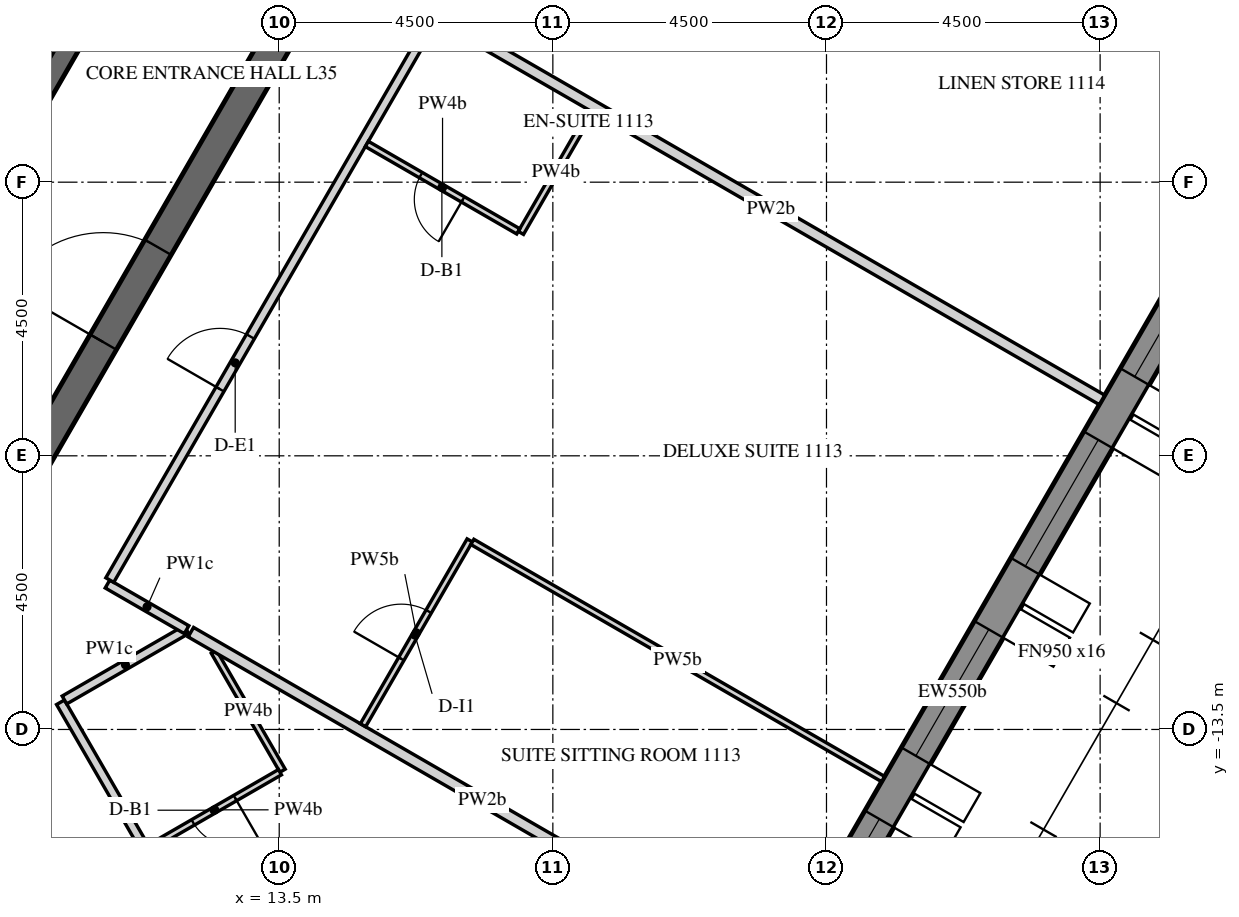
"""IFC4 building model, lengths in metres.
Left out: names, types, materials, properties, quantities, classifications, styles, units other than length and angle.
Written with IfcOpenShell. Run it as: python <this file> out.ifc"""

import sys

from ifc_helpers import new_model, si_unit, direction, frame, frame_2d, origin, place, context, subcontext, project, spatial, polyline, rectangle, outline, extrude, element, fill, save


model = new_model("IFC4")
c1 = context("Model", 3, precision=1e-05, world=origin(), true_north=direction((0.0, 1.0)))
c2 = subcontext(c1, "Body", "Model", "MODEL_VIEW")
j1 = project(units=[si_unit("LENGTHUNIT", "METRE"), si_unit("PLANEANGLEUNIT", "RADIAN")], contexts=[c1])
p1 = place(None, origin())
s1 = spatial("IfcSite", under=j1, at=p1, CompositionType="ELEMENT")
p2 = place(p1, origin())
s2 = spatial("IfcBuilding", under=s1, at=p2, CompositionType="ELEMENT")
p3 = place(p2, frame((0.0, 0.0, 152.7)))
s3 = spatial("IfcBuildingStorey", under=s2, at=p3, CompositionType="ELEMENT", Elevation=152.7)
p4 = place(p3, frame((17.63, -24.914, 0.0), z_axis=(0.0, 0.0, 1.0), x_axis=(0.499998569178, 0.866026229868, 0.0)))
e1 = element("IfcWall", 1, at=p4, inside=s3, PredefinedType="SOLIDWALL", context=c2, shape_type="SweptSolid", body=[
    extrude(outline(polyline([(-0.022, -0.275), (27.783, -0.275), (27.732, 0.275), (0.022, 0.275), (-0.022, -0.275)])), origin(), (0.0, 0.0, 1.0), 3.75),
])
p5 = place(p4, frame((1.879, 0.0, 0.9)))
e2 = element("IfcOpeningElement", 2, at=p5, cuts=e1, PredefinedType="OPENING", context=c2, shape_type="SweptSolid", body=[
    extrude(rectangle(XDim=2.4, YDim=2.4, at=frame_2d((1.2, 1.2))), frame((0.0, 0.285, 0.0), z_axis=(0.0, -1.0, 0.0), x_axis=(1.0, 0.0, 0.0)), (0.0, 0.0, 1.0), 0.57),
])
p6 = place(p4, frame((5.479, 0.0, 0.9)))
e3 = element("IfcOpeningElement", 3, at=p6, cuts=e1, PredefinedType="OPENING", context=c2, shape_type="SweptSolid", body=[
    extrude(rectangle(XDim=2.4, YDim=2.4, at=frame_2d((1.2, 1.2))), frame((0.0, 0.285, 0.0), z_axis=(0.0, -1.0, 0.0), x_axis=(1.0, 0.0, 0.0)), (0.0, 0.0, 1.0), 0.57),
])
p7 = place(p4, frame((9.079, 0.0, 0.9)))
e4 = element("IfcOpeningElement", 4, at=p7, cuts=e1, PredefinedType="OPENING", context=c2, shape_type="SweptSolid", body=[
    extrude(rectangle(XDim=2.4, YDim=2.4, at=frame_2d((1.2, 1.2))), frame((0.0, 0.285, 0.0), z_axis=(0.0, -1.0, 0.0), x_axis=(1.0, 0.0, 0.0)), (0.0, 0.0, 1.0), 0.57),
])
p8 = place(p4, frame((12.679, 0.0, 0.9)))
e5 = element("IfcOpeningElement", 5, at=p8, cuts=e1, PredefinedType="OPENING", context=c2, shape_type="SweptSolid", body=[
    extrude(rectangle(XDim=2.4, YDim=2.4, at=frame_2d((1.2, 1.2))), frame((0.0, 0.285, 0.0), z_axis=(0.0, -1.0, 0.0), x_axis=(1.0, 0.0, 0.0)), (0.0, 0.0, 1.0), 0.57),
])
p9 = place(p4, frame((16.279, 0.0, 0.9)))
e6 = element("IfcOpeningElement", 6, at=p9, cuts=e1, PredefinedType="OPENING", context=c2, shape_type="SweptSolid", body=[
    extrude(rectangle(XDim=2.4, YDim=2.4, at=frame_2d((1.2, 1.2))), frame((0.0, 0.285, 0.0), z_axis=(0.0, -1.0, 0.0), x_axis=(1.0, 0.0, 0.0)), (0.0, 0.0, 1.0), 0.57),
])
p10 = place(p4, frame((19.879, 0.0, 0.9)))
e7 = element("IfcOpeningElement", 7, at=p10, cuts=e1, PredefinedType="OPENING", context=c2, shape_type="SweptSolid", body=[
    extrude(rectangle(XDim=2.4, YDim=2.4, at=frame_2d((1.2, 1.2))), frame((0.0, 0.285, 0.0), z_axis=(0.0, -1.0, 0.0), x_axis=(1.0, 0.0, 0.0)), (0.0, 0.0, 1.0), 0.57),
])
p11 = place(p4, frame((23.479, 0.0, 0.9)))
e8 = element("IfcOpeningElement", 8, at=p11, cuts=e1, PredefinedType="OPENING", context=c2, shape_type="SweptSolid", body=[
    extrude(rectangle(XDim=2.4, YDim=2.4, at=frame_2d((1.2, 1.2))), frame((0.0, 0.285, 0.0), z_axis=(0.0, -1.0, 0.0), x_axis=(1.0, 0.0, 0.0)), (0.0, 0.0, 1.0), 0.57),
])
p12 = place(p3, frame((7.361, -12.75, 0.0), z_axis=(0.0, 0.0, 1.0), x_axis=(0.50000571537, 0.866022103989, 0.0)))
e9 = element("IfcWall", 9, at=p12, inside=s3, PredefinedType="SHEAR", context=c2, shape_type="SweptSolid", body=[
    extrude(outline(polyline([(-0.144, -0.25), (14.867, -0.25), (14.578, 0.25), (0.144, 0.25), (-0.144, -0.25)])), origin(), (0.0, 0.0, 1.0), 3.75),
])
p13 = place(p12, frame((6.49, 0.0, 0.0)))
e10 = element("IfcOpeningElement", 10, at=p13, cuts=e9, PredefinedType="OPENING", context=c2, shape_type="SweptSolid", body=[
    extrude(rectangle(XDim=1.8, YDim=2.4, at=frame_2d((0.9, 1.2))), frame((0.0, 0.26, 0.0), z_axis=(0.0, -1.0, 0.0), x_axis=(1.0, 0.0, 0.0)), (0.0, 0.0, 1.0), 0.52),
])
p14 = place(p3, frame((7.506, -13.0, 0.0), z_axis=(0.0, 0.0, 1.0), x_axis=(0.499988271576, -0.866032175087, 0.0)))
e11 = element("IfcWall", 11, at=p14, inside=s3, PredefinedType="SHEAR", context=c2, shape_type="SweptSolid", body=[
    extrude(rectangle(XDim=15.424, YDim=0.5, at=frame_2d((7.712, 0.0))), origin(), (0.0, 0.0, 1.0), 3.75),
])
p15 = place(p14, frame((6.812, 0.0, 0.0)))
e12 = element("IfcOpeningElement", 12, at=p15, cuts=e11, PredefinedType="OPENING", context=c2, shape_type="SweptSolid", body=[
    extrude(rectangle(XDim=1.8, YDim=2.4, at=frame_2d((0.9, 1.2))), frame((0.0, 0.26, 0.0), z_axis=(0.0, -1.0, 0.0), x_axis=(1.0, 0.0, 0.0)), (0.0, 0.0, 1.0), 0.52),
])
p16 = place(p3, frame((5.673, -9.825, 0.0), z_axis=(0.0, 0.0, 1.0), x_axis=(0.499995046907, 0.866028263435, 0.0)))
e13 = element("IfcWall", 13, at=p16, inside=s3, PredefinedType="SHEAR", context=c2, shape_type="SweptSolid", body=[
    extrude(outline(polyline([(-0.101, -0.175), (11.446, -0.175), (11.244, 0.175), (0.101, 0.175), (-0.101, -0.175)])), origin(), (0.0, 0.0, 1.0), 3.75),
])
p17 = place(p16, frame((4.801, 0.0, 0.0)))
e14 = element("IfcOpeningElement", 14, at=p17, cuts=e13, PredefinedType="OPENING", context=c2, shape_type="SweptSolid", body=[
    extrude(rectangle(XDim=1.8, YDim=2.4, at=frame_2d((0.9, 1.2))), frame((0.0, 0.185, 0.0), z_axis=(0.0, -1.0, 0.0), x_axis=(1.0, 0.0, 0.0)), (0.0, 0.0, 1.0), 0.37),
])
p18 = place(p3, frame((6.178, -14.8, 0.0), z_axis=(0.0, 0.0, 1.0), x_axis=(0.499984309814, -0.866034462328, 0.0)))
e15 = element("IfcWall", 15, at=p18, inside=s3, PredefinedType="PARTITIONING", context=c2, shape_type="SweptSolid", body=[
    extrude(rectangle(XDim=8.017, YDim=0.15, at=frame_2d((4.008, 0.0))), origin(), (0.0, 0.0, 1.0), 2.823),
])
p19 = place(p3, frame((13.699, -19.628, 0.0), z_axis=(0.0, 0.0, 1.0), x_axis=(-0.499998968938, 0.866025999068, 0.0)))
e16 = element("IfcWall", 16, at=p19, inside=s3, PredefinedType="PARTITIONING", context=c2, shape_type="SweptSolid", body=[
    extrude(rectangle(XDim=7.592, YDim=0.15, at=frame_2d((3.796, 0.0))), origin(), (0.0, 0.0, 1.0), 2.823),
])
p20 = place(p19, frame((2.033, 0.0, 0.0)))
e17 = element("IfcOpeningElement", 17, at=p20, cuts=e16, PredefinedType="OPENING", context=c2, shape_type="SweptSolid", body=[
    extrude(rectangle(XDim=1.0, YDim=2.1, at=frame_2d((0.5, 1.05))), frame((0.0, 0.085, 0.0), z_axis=(0.0, -1.0, 0.0), x_axis=(1.0, 0.0, 0.0)), (0.0, 0.0, 1.0), 0.17),
])
p21 = place(p3, frame((9.968, -13.016, 0.0), z_axis=(0.0, 0.0, 1.0), x_axis=(0.866022320763, 0.500005339912, 0.0)))
e18 = element("IfcWall", 18, at=p21, inside=s3, PredefinedType="PARTITIONING", context=c2, shape_type="SweptSolid", body=[
    extrude(rectangle(XDim=2.316, YDim=0.15, at=frame_2d((1.158, 0.0))), origin(), (0.0, 0.0, 1.0), 2.823),
])
p22 = place(p3, frame((11.977, -11.859, 0.0), z_axis=(0.0, 0.0, 1.0), x_axis=(-0.865993364801, 0.500055489042, 0.0)))
e19 = element("IfcWall", 19, at=p22, inside=s3, PredefinedType="PARTITIONING", context=c2, shape_type="SweptSolid", body=[
    extrude(rectangle(XDim=1.502, YDim=0.15, at=frame_2d((0.751, 0.0))), origin(), (0.0, 0.0, 1.0), 2.823),
])
p23 = place(p3, frame((10.714, -11.043, 0.0), z_axis=(0.0, 0.0, 1.0), x_axis=(0.500001980452, 0.866024260367, 0.0)))
e20 = element("IfcWall", 20, at=p23, inside=s3, PredefinedType="PARTITIONING", context=c2, shape_type="SweptSolid", body=[
    extrude(rectangle(XDim=12.752, YDim=0.15, at=frame_2d((6.376, 0.0))), origin(), (0.0, 0.0, 1.0), 2.823),
])
p24 = place(p23, frame((3.625, 0.0, 0.0)))
e21 = element("IfcOpeningElement", 21, at=p24, cuts=e20, PredefinedType="OPENING", context=c2, shape_type="SweptSolid", body=[
    extrude(rectangle(XDim=1.0, YDim=2.1, at=frame_2d((0.5, 1.05))), frame((0.0, 0.085, 0.0), z_axis=(0.0, -1.0, 0.0), x_axis=(1.0, 0.0, 0.0)), (0.0, 0.0, 1.0), 0.17),
])
p25 = place(p23, frame((11.602, 0.0, 0.0)))
e22 = element("IfcOpeningElement", 22, at=p25, cuts=e20, PredefinedType="OPENING", context=c2, shape_type="SweptSolid", body=[
    extrude(rectangle(XDim=1.0, YDim=2.1, at=frame_2d((0.5, 1.05))), frame((0.0, 0.085, 0.0), z_axis=(0.0, -1.0, 0.0), x_axis=(1.0, 0.0, 0.0)), (0.0, 0.0, 1.0), 0.17),
])
p26 = place(p3, frame((12.426, -12.223, 0.0), z_axis=(0.0, 0.0, 1.0), x_axis=(0.499919032186, -0.866072145528, 0.0)))
e23 = element("IfcWall", 23, at=p26, inside=s3, PredefinedType="PARTITIONING", context=c2, shape_type="SweptSolid", body=[
    extrude(rectangle(XDim=2.258, YDim=0.1, at=frame_2d((1.129, 0.0))), origin(), (0.0, 0.0, 1.0), 2.823),
])
p27 = place(p3, frame((13.512, -14.203, 0.0), z_axis=(0.0, 0.0, 1.0), x_axis=(-0.866006523861, -0.500032699561, 0.0)))
e24 = element("IfcWall", 24, at=p27, inside=s3, PredefinedType="PARTITIONING", context=c2, shape_type="SweptSolid", body=[
    extrude(rectangle(XDim=2.475, YDim=0.1, at=frame_2d((1.237, 0.0))), origin(), (0.0, 0.0, 1.0), 2.823),
])
p28 = place(p27, frame((0.85, 0.0, 0.0)))
e25 = element("IfcOpeningElement", 25, at=p28, cuts=e24, PredefinedType="OPENING", context=c2, shape_type="SweptSolid", body=[
    extrude(rectangle(XDim=0.8, YDim=2.1, at=frame_2d((0.4, 1.05))), frame((0.0, 0.06, 0.0), z_axis=(0.0, -1.0, 0.0), x_axis=(1.0, 0.0, 0.0)), (0.0, 0.0, 1.0), 0.12),
])
p29 = place(p3, frame((21.631, -17.433, 0.0), z_axis=(0.0, 0.0, 1.0), x_axis=(-0.866031296205, 0.499989793889, 0.0)))
e26 = element("IfcWall", 26, at=p29, inside=s3, PredefinedType="PARTITIONING", context=c2, shape_type="SweptSolid", body=[
    extrude(rectangle(XDim=11.067, YDim=0.18, at=frame_2d((5.534, 0.0))), origin(), (0.0, 0.0, 1.0), 2.823),
])
p30 = place(p3, frame((18.629, -3.333, 0.0), z_axis=(0.0, 0.0, 1.0), x_axis=(-0.500015210774, -0.866016621662, 0.0)))
e27 = element("IfcWall", 27, at=p30, inside=s3, PredefinedType="PARTITIONING", context=c2, shape_type="SweptSolid", body=[
    extrude(rectangle(XDim=2.31, YDim=0.1, at=frame_2d((1.155, 0.0))), origin(), (0.0, 0.0, 1.0), 2.823),
])
p31 = place(p3, frame((17.431, -5.309, 0.0), z_axis=(0.0, 0.0, 1.0), x_axis=(-0.866018712932, 0.500011588718, 0.0)))
e28 = element("IfcWall", 28, at=p31, inside=s3, PredefinedType="PARTITIONING", context=c2, shape_type="SweptSolid", body=[
    extrude(rectangle(XDim=2.875, YDim=0.1, at=frame_2d((1.438, 0.0))), origin(), (0.0, 0.0, 1.0), 2.823),
])
p32 = place(p31, frame((1.05, 0.0, 0.0)))
e29 = element("IfcOpeningElement", 29, at=p32, cuts=e28, PredefinedType="OPENING", context=c2, shape_type="SweptSolid", body=[
    extrude(rectangle(XDim=0.8, YDim=2.1, at=frame_2d((0.4, 1.05))), frame((0.0, 0.06, 0.0), z_axis=(0.0, -1.0, 0.0), x_axis=(1.0, 0.0, 0.0)), (0.0, 0.0, 1.0), 0.12),
])
p33 = place(p3, frame((14.878, -13.43, 0.0), z_axis=(0.0, 0.0, 1.0), x_axis=(0.500021481416, 0.866013001128, 0.0)))
e30 = element("IfcWall", 30, at=p33, inside=s3, PredefinedType="PARTITIONING", context=c2, shape_type="SweptSolid", body=[
    extrude(rectangle(XDim=3.51, YDim=0.1, at=frame_2d((1.755, 0.0))), origin(), (0.0, 0.0, 1.0), 2.823),
])
p34 = place(p33, frame((1.26, 0.0, 0.0)))
e31 = element("IfcOpeningElement", 31, at=p34, cuts=e30, PredefinedType="OPENING", context=c2, shape_type="SweptSolid", body=[
    extrude(rectangle(XDim=0.9, YDim=2.1, at=frame_2d((0.45, 1.05))), frame((0.0, 0.06, 0.0), z_axis=(0.0, -1.0, 0.0), x_axis=(1.0, 0.0, 0.0)), (0.0, 0.0, 1.0), 0.12),
])
p35 = place(p3, frame((16.676, -10.416, 0.0), z_axis=(0.0, 0.0, 1.0), x_axis=(0.866034953203, -0.499983459557, 0.0)))
e32 = element("IfcWall", 32, at=p35, inside=s3, PredefinedType="PARTITIONING", context=c2, shape_type="SweptSolid", body=[
    extrude(rectangle(XDim=7.8, YDim=0.1, at=frame_2d((3.9, 0.0))), origin(), (0.0, 0.0, 1.0), 2.823),
])
p36 = place(p3, frame((27.031, -8.08, 0.0), z_axis=(0.0, 0.0, 1.0), x_axis=(-0.86602780907, 0.499995833901, 0.0)))
e33 = element("IfcWall", 33, at=p36, inside=s3, PredefinedType="PARTITIONING", context=c2, shape_type="SweptSolid", body=[
    extrude(rectangle(XDim=12.575, YDim=0.18, at=frame_2d((6.287, 0.0))), origin(), (0.0, 0.0, 1.0), 2.823),
])
p37 = place(p7, frame((0.0, 0.205, 0.0)))
e34 = element("IfcWindow", 34, at=p37, inside=s3, PartitioningType="DOUBLE_PANEL_VERTICAL", PredefinedType="WINDOW", context=c2, shape_type="SweptSolid", body=[
    extrude(rectangle(XDim=2.4, YDim=2.4, at=frame_2d((1.2, 1.2))), frame((0.0, 0.03, 0.0), z_axis=(0.0, -1.0, 0.0), x_axis=(1.0, 0.0, 0.0)), (0.0, 0.0, 1.0), 0.06),
])
fill(e4, e34)
p38 = place(p8, frame((0.0, 0.205, 0.0)))
e35 = element("IfcWindow", 35, at=p38, inside=s3, PartitioningType="DOUBLE_PANEL_VERTICAL", PredefinedType="WINDOW", context=c2, shape_type="SweptSolid", body=[
    extrude(rectangle(XDim=2.4, YDim=2.4, at=frame_2d((1.2, 1.2))), frame((0.0, 0.03, 0.0), z_axis=(0.0, -1.0, 0.0), x_axis=(1.0, 0.0, 0.0)), (0.0, 0.0, 1.0), 0.06),
])
fill(e5, e35)
p39 = place(p9, frame((0.0, 0.205, 0.0)))
e36 = element("IfcWindow", 36, at=p39, inside=s3, PartitioningType="DOUBLE_PANEL_VERTICAL", PredefinedType="WINDOW", context=c2, shape_type="SweptSolid", body=[
    extrude(rectangle(XDim=2.4, YDim=2.4, at=frame_2d((1.2, 1.2))), frame((0.0, 0.03, 0.0), z_axis=(0.0, -1.0, 0.0), x_axis=(1.0, 0.0, 0.0)), (0.0, 0.0, 1.0), 0.06),
])
fill(e6, e36)
p40 = place(p10, frame((0.0, 0.205, 0.0)))
e37 = element("IfcWindow", 37, at=p40, inside=s3, PartitioningType="DOUBLE_PANEL_VERTICAL", PredefinedType="WINDOW", context=c2, shape_type="SweptSolid", body=[
    extrude(rectangle(XDim=2.4, YDim=2.4, at=frame_2d((1.2, 1.2))), frame((0.0, 0.03, 0.0), z_axis=(0.0, -1.0, 0.0), x_axis=(1.0, 0.0, 0.0)), (0.0, 0.0, 1.0), 0.06),
])
fill(e7, e37)
p41 = place(p13, origin())
e38 = element("IfcDoor", 38, at=p41, inside=s3, OperationType="DOUBLE_DOOR_SINGLE_SWING", PredefinedType="DOOR", context=c2, shape_type="SweptSolid", body=[
    extrude(rectangle(XDim=1.8, YDim=2.4, at=frame_2d((0.9, 1.2))), frame((0.0, 0.025, 0.0), z_axis=(0.0, -1.0, 0.0), x_axis=(1.0, 0.0, 0.0)), (0.0, 0.0, 1.0), 0.05),
])
fill(e10, e38)
p42 = place(p28, origin())
e39 = element("IfcDoor", 39, at=p42, inside=s3, OperationType="SINGLE_SWING_RIGHT", PredefinedType="DOOR", context=c2, shape_type="SweptSolid", body=[
    extrude(rectangle(XDim=0.8, YDim=2.1, at=frame_2d((0.4, 1.05))), frame((0.0, 0.025, 0.0), z_axis=(0.0, -1.0, 0.0), x_axis=(1.0, 0.0, 0.0)), (0.0, 0.0, 1.0), 0.05),
])
fill(e25, e39)
p43 = place(p24, origin())
e40 = element("IfcDoor", 40, at=p43, inside=s3, OperationType="SINGLE_SWING_RIGHT", PredefinedType="DOOR", context=c2, shape_type="SweptSolid", body=[
    extrude(rectangle(XDim=1.0, YDim=2.1, at=frame_2d((0.5, 1.05))), frame((0.0, 0.025, 0.0), z_axis=(0.0, -1.0, 0.0), x_axis=(1.0, 0.0, 0.0)), (0.0, 0.0, 1.0), 0.05),
])
fill(e21, e40)
p44 = place(p32, origin())
e41 = element("IfcDoor", 41, at=p44, inside=s3, OperationType="SINGLE_SWING_LEFT", PredefinedType="DOOR", context=c2, shape_type="SweptSolid", body=[
    extrude(rectangle(XDim=0.8, YDim=2.1, at=frame_2d((0.4, 1.05))), frame((0.0, 0.025, 0.0), z_axis=(0.0, -1.0, 0.0), x_axis=(1.0, 0.0, 0.0)), (0.0, 0.0, 1.0), 0.05),
])
fill(e29, e41)
p45 = place(p34, origin())
e42 = element("IfcDoor", 42, at=p45, inside=s3, OperationType="SINGLE_SWING_RIGHT", PredefinedType="DOOR", context=c2, shape_type="SweptSolid", body=[
    extrude(rectangle(XDim=0.9, YDim=2.1, at=frame_2d((0.45, 1.05))), frame((0.0, 0.025, 0.0), z_axis=(0.0, -1.0, 0.0), x_axis=(1.0, 0.0, 0.0)), (0.0, 0.0, 1.0), 0.05),
])
fill(e31, e42)
save(model, sys.argv[1])
